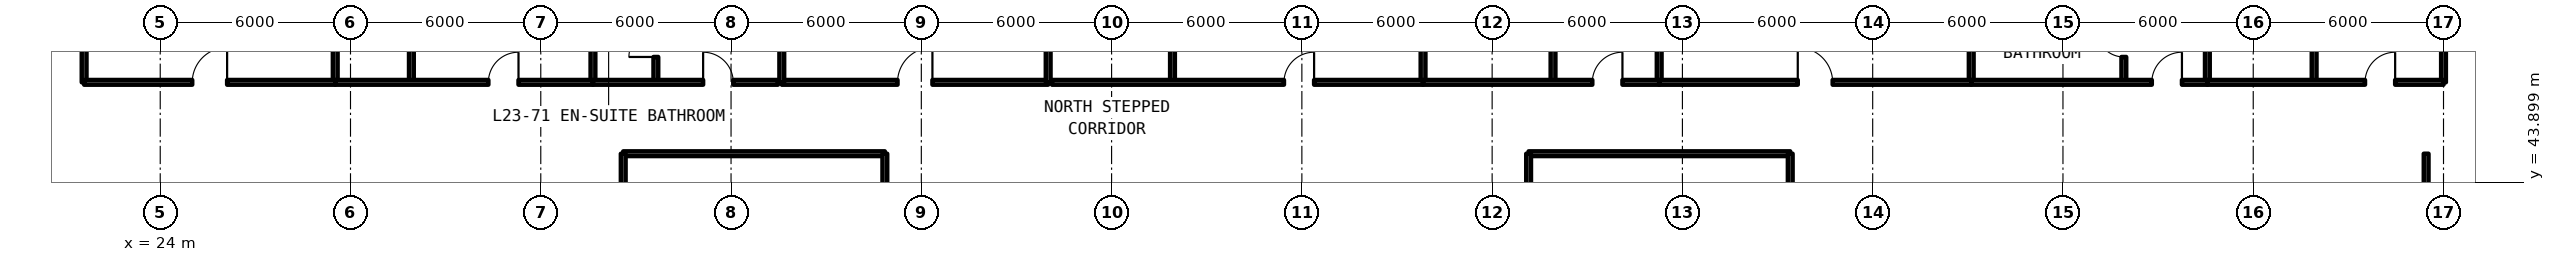
"""IFC4 building model, lengths in metres.
Left out: names, types, materials, properties, quantities, classifications, styles, units other than length and angle.
Written with IfcOpenShell. Run it as: python <this file> out.ifc"""

import sys

from ifc_helpers import new_model, si_unit, direction, frame, frame_2d, origin, place, context, subcontext, project, spatial, rectangle, extrude, element, fill, save


model = new_model("IFC4")
c1 = context("Model", 3, precision=1e-05, world=origin(), true_north=direction((0.0, 1.0)))
c2 = subcontext(c1, "Body", "Model", "MODEL_VIEW")
j1 = project(units=[si_unit("LENGTHUNIT", "METRE"), si_unit("PLANEANGLEUNIT", "RADIAN")], contexts=[c1])
p1 = place(None, origin())
s1 = spatial("IfcSite", under=j1, at=p1, CompositionType="ELEMENT")
p2 = place(p1, origin())
s2 = spatial("IfcBuilding", under=s1, at=p2, CompositionType="ELEMENT")
p3 = place(p2, frame((0.0, 0.0, 85.47)))
s3 = spatial("IfcBuildingStorey", under=s2, at=p3, CompositionType="ELEMENT", Elevation=85.47)
p4 = place(p3, frame((38.6, 44.8, 0.0), z_axis=(0.0, 0.0, 1.0), x_axis=(1.0, 0.0, 0.0)))
e1 = element("IfcWall", 1, at=p4, inside=s3, PredefinedType="SOLIDWALL", context=c2, shape_type="SweptSolid", body=[
    extrude(rectangle(XDim=8.25, YDim=0.15, at=frame_2d((4.125, 0.0))), origin(), (0.0, 0.0, 1.0), 2.35),
])
p5 = place(p3, frame((38.6, 22.4, 0.0), z_axis=(0.0, 0.0, 1.0), x_axis=(0.0, 1.0, 0.0)))
e2 = element("IfcWall", 2, at=p5, inside=s3, PredefinedType="SOLIDWALL", context=c2, shape_type="SweptSolid", body=[
    extrude(rectangle(XDim=22.4, YDim=0.15, at=frame_2d((11.2, 0.0))), origin(), (0.0, 0.0, 1.0), 2.35),
])
p6 = place(p5, frame((8.025, 0.0, 0.0)))
e3 = element("IfcOpeningElement", 3, at=p6, cuts=e2, PredefinedType="OPENING", context=c2, shape_type="SweptSolid", body=[
    extrude(rectangle(XDim=0.95, YDim=2.15, at=frame_2d((0.475, 1.075))), frame((0.0, 0.085, 0.0), z_axis=(0.0, -1.0, 0.0), x_axis=(1.0, 0.0, 0.0)), (0.0, 0.0, 1.0), 0.17),
])
p7 = place(p3, frame((46.85, 22.4, 0.0), z_axis=(0.0, 0.0, 1.0), x_axis=(0.0, 1.0, 0.0)))
e4 = element("IfcWall", 4, at=p7, inside=s3, PredefinedType="SOLIDWALL", context=c2, shape_type="SweptSolid", body=[
    extrude(rectangle(XDim=22.4, YDim=0.15, at=frame_2d((11.2, 0.0))), origin(), (0.0, 0.0, 1.0), 2.35),
])
p8 = place(p3, frame((67.15, 44.8, 0.0), z_axis=(0.0, 0.0, 1.0), x_axis=(1.0, 0.0, 0.0)))
e5 = element("IfcWall", 5, at=p8, inside=s3, PredefinedType="SOLIDWALL", context=c2, shape_type="SweptSolid", body=[
    extrude(rectangle(XDim=8.25, YDim=0.15, at=frame_2d((4.125, 0.0))), origin(), (0.0, 0.0, 1.0), 2.35),
])
p9 = place(p3, frame((67.15, 22.4, 0.0), z_axis=(0.0, 0.0, 1.0), x_axis=(0.0, 1.0, 0.0)))
e6 = element("IfcWall", 6, at=p9, inside=s3, PredefinedType="SOLIDWALL", context=c2, shape_type="SweptSolid", body=[
    extrude(rectangle(XDim=22.4, YDim=0.15, at=frame_2d((11.2, 0.0))), origin(), (0.0, 0.0, 1.0), 2.35),
])
p10 = place(p3, frame((75.4, 22.4, 0.0), z_axis=(0.0, 0.0, 1.0), x_axis=(0.0, 1.0, 0.0)))
e7 = element("IfcWall", 7, at=p10, inside=s3, PredefinedType="SOLIDWALL", context=c2, shape_type="SweptSolid", body=[
    extrude(rectangle(XDim=22.4, YDim=0.15, at=frame_2d((11.2, 0.0))), origin(), (0.0, 0.0, 1.0), 2.35),
])
p11 = place(p10, frame((8.025, 0.0, 0.0)))
e8 = element("IfcOpeningElement", 8, at=p11, cuts=e7, PredefinedType="OPENING", context=c2, shape_type="SweptSolid", body=[
    extrude(rectangle(XDim=0.95, YDim=2.15, at=frame_2d((0.475, 1.075))), frame((0.0, 0.085, 0.0), z_axis=(0.0, -1.0, 0.0), x_axis=(1.0, 0.0, 0.0)), (0.0, 0.0, 1.0), 0.17),
])
p12 = place(p3, frame((95.452, 39.6, 0.0), z_axis=(0.0, 0.0, 1.0), x_axis=(0.0, 1.0, 0.0)))
e9 = element("IfcWall", 9, at=p12, inside=s3, PredefinedType="PARTITIONING", context=c2, shape_type="SweptSolid", body=[
    extrude(rectangle(XDim=5.2, YDim=0.15, at=frame_2d((2.6, 0.0))), origin(), (0.0, 0.0, 1.0), 2.35),
])
p13 = place(p3, frame((43.6, 47.05, 0.0), z_axis=(0.0, 0.0, 1.0), x_axis=(1.0, 0.0, 0.0)))
e10 = element("IfcWall", 10, at=p13, inside=s3, PredefinedType="SOLIDWALL", context=c2, shape_type="SweptSolid", body=[
    extrude(rectangle(XDim=8.4, YDim=0.15, at=frame_2d((4.2, 0.0))), origin(), (0.0, 0.0, 1.0), 2.35),
])
p14 = place(p13, frame((3.65, 0.0, 0.0)))
e11 = element("IfcOpeningElement", 11, at=p14, cuts=e10, PredefinedType="OPENING", context=c2, shape_type="SweptSolid", body=[
    extrude(rectangle(XDim=1.1, YDim=2.15, at=frame_2d((0.55, 1.075))), frame((0.0, 0.085, 0.0), z_axis=(0.0, -1.0, 0.0), x_axis=(1.0, 0.0, 0.0)), (0.0, 0.0, 1.0), 0.17),
])
for number, where, z_axis, x_axis in (
    (12, (43.6, 47.05, 0.0), (0.0, 0.0, 1.0), (0.0, 1.0, 0.0)),
    (13, (52.0, 47.05, 0.0), (0.0, 0.0, 1.0), (0.0, 1.0, 0.0)),
    (14, (21.6, 47.05, 0.0), (0.0, 0.0, 1.0), (0.0, 1.0, 0.0)),
    (15, (29.519, 47.05, 0.0), (0.0, 0.0, 1.0), (0.0, 1.0, 0.0)),
):
    element("IfcWall", number, at=place(p3, frame(where, z_axis=z_axis, x_axis=x_axis)), inside=s3, PredefinedType="SOLIDWALL", context=c2, shape_type="SweptSolid", body=[
        extrude(rectangle(XDim=10.3, YDim=0.15, at=frame_2d((5.15, 0.0))), origin(), (0.0, 0.0, 1.0), 2.35),
    ])
p15 = place(p3, frame((21.6, 47.05, 0.0), z_axis=(0.0, 0.0, 1.0), x_axis=(1.0, 0.0, 0.0)))
e16 = element("IfcWall", 16, at=p15, inside=s3, PredefinedType="SOLIDWALL", context=c2, shape_type="SweptSolid", body=[
    extrude(rectangle(XDim=7.918, YDim=0.15, at=frame_2d((3.959, 0.0))), origin(), (0.0, 0.0, 1.0), 2.35),
])
p16 = place(p15, frame((3.409, 0.0, 0.0)))
e17 = element("IfcOpeningElement", 17, at=p16, cuts=e16, PredefinedType="OPENING", context=c2, shape_type="SweptSolid", body=[
    extrude(rectangle(XDim=1.1, YDim=2.15, at=frame_2d((0.55, 1.075))), frame((0.0, 0.085, 0.0), z_axis=(0.0, -1.0, 0.0), x_axis=(1.0, 0.0, 0.0)), (0.0, 0.0, 1.0), 0.17),
])
p17 = place(p3, frame((37.646, 47.05, 0.0), z_axis=(0.0, 0.0, 1.0), x_axis=(0.0, 1.0, 0.0)))
e18 = element("IfcWall", 18, at=p17, inside=s3, PredefinedType="SOLIDWALL", context=c2, shape_type="SweptSolid", body=[
    extrude(rectangle(XDim=10.3, YDim=0.15, at=frame_2d((5.15, 0.0))), origin(), (0.0, 0.0, 1.0), 2.35),
])
p18 = place(p3, frame((31.92, 47.05, 0.0), z_axis=(0.0, 0.0, 1.0), x_axis=(0.0, 1.0, 0.0)))
e19 = element("IfcWall", 19, at=p18, inside=s3, PredefinedType="PARTITIONING", context=c2, shape_type="SweptSolid", body=[
    extrude(rectangle(XDim=6.67, YDim=0.15, at=frame_2d((3.335, 0.0))), origin(), (0.0, 0.0, 1.0), 2.35),
])
p19 = place(p18, frame((1.543, 0.0, 0.0)))
e20 = element("IfcOpeningElement", 20, at=p19, cuts=e19, PredefinedType="OPENING", context=c2, shape_type="SweptSolid", body=[
    extrude(rectangle(XDim=0.85, YDim=2.1, at=frame_2d((0.425, 1.05))), frame((0.0, 0.085, 0.0), z_axis=(0.0, -1.0, 0.0), x_axis=(1.0, 0.0, 0.0)), (0.0, 0.0, 1.0), 0.17),
])
p20 = place(p18, frame((4.878, 0.0, 0.0)))
e21 = element("IfcOpeningElement", 21, at=p20, cuts=e19, PredefinedType="OPENING", context=c2, shape_type="SweptSolid", body=[
    extrude(rectangle(XDim=0.85, YDim=2.1, at=frame_2d((0.425, 1.05))), frame((0.0, 0.085, 0.0), z_axis=(0.0, -1.0, 0.0), x_axis=(1.0, 0.0, 0.0)), (0.0, 0.0, 1.0), 0.17),
])
p21 = place(p3, frame((29.519, 47.05, 0.0), z_axis=(0.0, 0.0, 1.0), x_axis=(1.0, 0.0, 0.0)))
e22 = element("IfcWall", 22, at=p21, inside=s3, PredefinedType="SOLIDWALL", context=c2, shape_type="SweptSolid", body=[
    extrude(rectangle(XDim=8.127, YDim=0.15, at=frame_2d((4.063, 0.0))), origin(), (0.0, 0.0, 1.0), 2.35),
])
p22 = place(p21, frame((4.829, 0.0, 0.0)))
e23 = element("IfcOpeningElement", 23, at=p22, cuts=e22, PredefinedType="OPENING", context=c2, shape_type="SweptSolid", body=[
    extrude(rectangle(XDim=0.95, YDim=2.15, at=frame_2d((0.475, 1.075))), frame((0.0, 0.085, 0.0), z_axis=(0.0, -1.0, 0.0), x_axis=(1.0, 0.0, 0.0)), (0.0, 0.0, 1.0), 0.17),
])
p23 = place(p3, frame((39.629, 47.05, 0.0), z_axis=(0.0, 0.0, 1.0), x_axis=(0.0, 1.0, 0.0)))
e24 = element("IfcWall", 24, at=p23, inside=s3, PredefinedType="PARTITIONING", context=c2, shape_type="SweptSolid", body=[
    extrude(rectangle(XDim=10.3, YDim=0.15, at=frame_2d((5.15, 0.0))), origin(), (0.0, 0.0, 1.0), 2.35),
])
p24 = place(p23, frame((0.8, 0.0, 0.0)))
e25 = element("IfcOpeningElement", 25, at=p24, cuts=e24, PredefinedType="OPENING", context=c2, shape_type="SweptSolid", body=[
    extrude(rectangle(XDim=0.85, YDim=2.1, at=frame_2d((0.425, 1.05))), frame((0.0, 0.085, 0.0), z_axis=(0.0, -1.0, 0.0), x_axis=(1.0, 0.0, 0.0)), (0.0, 0.0, 1.0), 0.17),
])
p25 = place(p23, frame((5.25, 0.0, 0.0)))
e26 = element("IfcOpeningElement", 26, at=p25, cuts=e24, PredefinedType="OPENING", context=c2, shape_type="SweptSolid", body=[
    extrude(rectangle(XDim=0.85, YDim=2.1, at=frame_2d((0.425, 1.05))), frame((0.0, 0.085, 0.0), z_axis=(0.0, -1.0, 0.0), x_axis=(1.0, 0.0, 0.0)), (0.0, 0.0, 1.0), 0.17),
])
p26 = place(p3, frame((37.646, 47.05, 0.0), z_axis=(0.0, 0.0, 1.0), x_axis=(1.0, 0.0, 0.0)))
e27 = element("IfcWall", 27, at=p26, inside=s3, PredefinedType="SOLIDWALL", context=c2, shape_type="SweptSolid", body=[
    extrude(rectangle(XDim=5.834, YDim=0.15, at=frame_2d((2.917, 0.0))), origin(), (0.0, 0.0, 1.0), 2.35),
])
p27 = place(p26, frame((3.474, 0.0, 0.0)))
e28 = element("IfcOpeningElement", 28, at=p27, cuts=e27, PredefinedType="OPENING", context=c2, shape_type="SweptSolid", body=[
    extrude(rectangle(XDim=0.95, YDim=2.15, at=frame_2d((0.475, 1.075))), frame((0.0, 0.085, 0.0), z_axis=(0.0, -1.0, 0.0), x_axis=(1.0, 0.0, 0.0)), (0.0, 0.0, 1.0), 0.17),
])
for number, where, z_axis, x_axis in (
    (29, (96.0, 47.05, 0.0), (0.0, 0.0, 1.0), (0.0, 1.0, 0.0)),
    (30, (63.821, 47.05, 0.0), (0.0, 0.0, 1.0), (0.0, 1.0, 0.0)),
):
    element("IfcWall", number, at=place(p3, frame(where, z_axis=z_axis, x_axis=x_axis)), inside=s3, PredefinedType="SOLIDWALL", context=c2, shape_type="SweptSolid", body=[
        extrude(rectangle(XDim=10.3, YDim=0.15, at=frame_2d((5.15, 0.0))), origin(), (0.0, 0.0, 1.0), 2.35),
    ])
p28 = place(p3, frame((55.92, 47.05, 0.0), z_axis=(0.0, 0.0, 1.0), x_axis=(0.0, 1.0, 0.0)))
e31 = element("IfcWall", 31, at=p28, inside=s3, PredefinedType="PARTITIONING", context=c2, shape_type="SweptSolid", body=[
    extrude(rectangle(XDim=5.452, YDim=0.15, at=frame_2d((2.726, 0.0))), origin(), (0.0, 0.0, 1.0), 2.35),
])
p29 = place(p28, frame((1.183, 0.0, 0.0)))
e32 = element("IfcOpeningElement", 32, at=p29, cuts=e31, PredefinedType="OPENING", context=c2, shape_type="SweptSolid", body=[
    extrude(rectangle(XDim=0.85, YDim=2.1, at=frame_2d((0.425, 1.05))), frame((0.0, 0.085, 0.0), z_axis=(0.0, -1.0, 0.0), x_axis=(1.0, 0.0, 0.0)), (0.0, 0.0, 1.0), 0.17),
])
p30 = place(p28, frame((3.909, 0.0, 0.0)))
e33 = element("IfcOpeningElement", 33, at=p30, cuts=e31, PredefinedType="OPENING", context=c2, shape_type="SweptSolid", body=[
    extrude(rectangle(XDim=0.85, YDim=2.1, at=frame_2d((0.425, 1.05))), frame((0.0, 0.085, 0.0), z_axis=(0.0, -1.0, 0.0), x_axis=(1.0, 0.0, 0.0)), (0.0, 0.0, 1.0), 0.17),
])
p31 = place(p3, frame((52.12, 47.05, 0.0), z_axis=(0.0, 0.0, 1.0), x_axis=(1.0, 0.0, 0.0)))
e34 = element("IfcWall", 34, at=p31, inside=s3, PredefinedType="SOLIDWALL", context=c2, shape_type="SweptSolid", body=[
    extrude(rectangle(XDim=11.701, YDim=0.15, at=frame_2d((5.851, 0.0))), origin(), (0.0, 0.0, 1.0), 2.35),
])
p32 = place(p31, frame((7.316, 0.0, 0.0)))
e35 = element("IfcOpeningElement", 35, at=p32, cuts=e34, PredefinedType="OPENING", context=c2, shape_type="SweptSolid", body=[
    extrude(rectangle(XDim=0.95, YDim=2.15, at=frame_2d((0.475, 1.075))), frame((0.0, 0.085, 0.0), z_axis=(0.0, -1.0, 0.0), x_axis=(1.0, 0.0, 0.0)), (0.0, 0.0, 1.0), 0.17),
])
p33 = place(p3, frame((71.268, 47.05, 0.0), z_axis=(0.0, 0.0, 1.0), x_axis=(0.0, 1.0, 0.0)))
e36 = element("IfcWall", 36, at=p33, inside=s3, PredefinedType="SOLIDWALL", context=c2, shape_type="SweptSolid", body=[
    extrude(rectangle(XDim=10.3, YDim=0.15, at=frame_2d((5.15, 0.0))), origin(), (0.0, 0.0, 1.0), 2.35),
])
p34 = place(p3, frame((67.92, 47.05, 0.0), z_axis=(0.0, 0.0, 1.0), x_axis=(0.0, 1.0, 0.0)))
e37 = element("IfcWall", 37, at=p34, inside=s3, PredefinedType="PARTITIONING", context=c2, shape_type="SweptSolid", body=[
    extrude(rectangle(XDim=6.338, YDim=0.15, at=frame_2d((3.169, 0.0))), origin(), (0.0, 0.0, 1.0), 2.35),
])
p35 = place(p34, frame((1.445, 0.0, 0.0)))
e38 = element("IfcOpeningElement", 38, at=p35, cuts=e37, PredefinedType="OPENING", context=c2, shape_type="SweptSolid", body=[
    extrude(rectangle(XDim=0.85, YDim=2.1, at=frame_2d((0.425, 1.05))), frame((0.0, 0.085, 0.0), z_axis=(0.0, -1.0, 0.0), x_axis=(1.0, 0.0, 0.0)), (0.0, 0.0, 1.0), 0.17),
])
p36 = place(p34, frame((4.614, 0.0, 0.0)))
e39 = element("IfcOpeningElement", 39, at=p36, cuts=e37, PredefinedType="OPENING", context=c2, shape_type="SweptSolid", body=[
    extrude(rectangle(XDim=0.85, YDim=2.1, at=frame_2d((0.425, 1.05))), frame((0.0, 0.085, 0.0), z_axis=(0.0, -1.0, 0.0), x_axis=(1.0, 0.0, 0.0)), (0.0, 0.0, 1.0), 0.17),
])
p37 = place(p3, frame((63.821, 47.05, 0.0), z_axis=(0.0, 0.0, 1.0), x_axis=(1.0, 0.0, 0.0)))
e40 = element("IfcWall", 40, at=p37, inside=s3, PredefinedType="SOLIDWALL", context=c2, shape_type="SweptSolid", body=[
    extrude(rectangle(XDim=7.446, YDim=0.15, at=frame_2d((3.723, 0.0))), origin(), (0.0, 0.0, 1.0), 2.35),
])
p38 = place(p37, frame((5.337, 0.0, 0.0)))
e41 = element("IfcOpeningElement", 41, at=p38, cuts=e40, PredefinedType="OPENING", context=c2, shape_type="SweptSolid", body=[
    extrude(rectangle(XDim=0.95, YDim=2.15, at=frame_2d((0.475, 1.075))), frame((0.0, 0.085, 0.0), z_axis=(0.0, -1.0, 0.0), x_axis=(1.0, 0.0, 0.0)), (0.0, 0.0, 1.0), 0.17),
])
p39 = place(p3, frame((81.107, 47.05, 0.0), z_axis=(0.0, 0.0, 1.0), x_axis=(0.0, 1.0, 0.0)))
e42 = element("IfcWall", 42, at=p39, inside=s3, PredefinedType="SOLIDWALL", context=c2, shape_type="SweptSolid", body=[
    extrude(rectangle(XDim=10.3, YDim=0.15, at=frame_2d((5.15, 0.0))), origin(), (0.0, 0.0, 1.0), 2.35),
])
p40 = place(p3, frame((71.268, 47.05, 0.0), z_axis=(0.0, 0.0, 1.0), x_axis=(1.0, 0.0, 0.0)))
e43 = element("IfcWall", 43, at=p40, inside=s3, PredefinedType="SOLIDWALL", context=c2, shape_type="SweptSolid", body=[
    extrude(rectangle(XDim=9.84, YDim=0.15, at=frame_2d((4.92, 0.0))), origin(), (0.0, 0.0, 1.0), 2.35),
])
p41 = place(p40, frame((4.37, 0.0, 0.0)))
e44 = element("IfcOpeningElement", 44, at=p41, cuts=e43, PredefinedType="OPENING", context=c2, shape_type="SweptSolid", body=[
    extrude(rectangle(XDim=1.1, YDim=2.15, at=frame_2d((0.55, 1.075))), frame((0.0, 0.085, 0.0), z_axis=(0.0, -1.0, 0.0), x_axis=(1.0, 0.0, 0.0)), (0.0, 0.0, 1.0), 0.17),
])
p42 = place(p3, frame((88.554, 47.05, 0.0), z_axis=(0.0, 0.0, 1.0), x_axis=(0.0, 1.0, 0.0)))
e45 = element("IfcWall", 45, at=p42, inside=s3, PredefinedType="SOLIDWALL", context=c2, shape_type="SweptSolid", body=[
    extrude(rectangle(XDim=10.3, YDim=0.15, at=frame_2d((5.15, 0.0))), origin(), (0.0, 0.0, 1.0), 2.35),
])
p43 = place(p3, frame((85.92, 47.05, 0.0), z_axis=(0.0, 0.0, 1.0), x_axis=(0.0, 1.0, 0.0)))
e46 = element("IfcWall", 46, at=p43, inside=s3, PredefinedType="PARTITIONING", context=c2, shape_type="SweptSolid", body=[
    extrude(rectangle(XDim=10.3, YDim=0.15, at=frame_2d((5.15, 0.0))), origin(), (0.0, 0.0, 1.0), 2.35),
])
p44 = place(p43, frame((0.8, 0.0, 0.0)))
e47 = element("IfcOpeningElement", 47, at=p44, cuts=e46, PredefinedType="OPENING", context=c2, shape_type="SweptSolid", body=[
    extrude(rectangle(XDim=0.85, YDim=2.1, at=frame_2d((0.425, 1.05))), frame((0.0, 0.085, 0.0), z_axis=(0.0, -1.0, 0.0), x_axis=(1.0, 0.0, 0.0)), (0.0, 0.0, 1.0), 0.17),
])
p45 = place(p43, frame((5.25, 0.0, 0.0)))
e48 = element("IfcOpeningElement", 48, at=p45, cuts=e46, PredefinedType="OPENING", context=c2, shape_type="SweptSolid", body=[
    extrude(rectangle(XDim=0.85, YDim=2.1, at=frame_2d((0.425, 1.05))), frame((0.0, 0.085, 0.0), z_axis=(0.0, -1.0, 0.0), x_axis=(1.0, 0.0, 0.0)), (0.0, 0.0, 1.0), 0.17),
])
p46 = place(p3, frame((81.107, 47.05, 0.0), z_axis=(0.0, 0.0, 1.0), x_axis=(1.0, 0.0, 0.0)))
e49 = element("IfcWall", 49, at=p46, inside=s3, PredefinedType="SOLIDWALL", context=c2, shape_type="SweptSolid", body=[
    extrude(rectangle(XDim=7.446, YDim=0.15, at=frame_2d((3.723, 0.0))), origin(), (0.0, 0.0, 1.0), 2.35),
])
p47 = place(p46, frame((5.694, 0.0, 0.0)))
e50 = element("IfcOpeningElement", 50, at=p47, cuts=e49, PredefinedType="OPENING", context=c2, shape_type="SweptSolid", body=[
    extrude(rectangle(XDim=0.95, YDim=2.15, at=frame_2d((0.475, 1.075))), frame((0.0, 0.085, 0.0), z_axis=(0.0, -1.0, 0.0), x_axis=(1.0, 0.0, 0.0)), (0.0, 0.0, 1.0), 0.17),
])
p48 = place(p3, frame((91.92, 47.05, 0.0), z_axis=(0.0, 0.0, 1.0), x_axis=(0.0, 1.0, 0.0)))
e51 = element("IfcWall", 51, at=p48, inside=s3, PredefinedType="PARTITIONING", context=c2, shape_type="SweptSolid", body=[
    extrude(rectangle(XDim=6.338, YDim=0.15, at=frame_2d((3.169, 0.0))), origin(), (0.0, 0.0, 1.0), 2.35),
])
p49 = place(p48, frame((1.445, 0.0, 0.0)))
e52 = element("IfcOpeningElement", 52, at=p49, cuts=e51, PredefinedType="OPENING", context=c2, shape_type="SweptSolid", body=[
    extrude(rectangle(XDim=0.85, YDim=2.1, at=frame_2d((0.425, 1.05))), frame((0.0, 0.085, 0.0), z_axis=(0.0, -1.0, 0.0), x_axis=(1.0, 0.0, 0.0)), (0.0, 0.0, 1.0), 0.17),
])
p50 = place(p48, frame((4.614, 0.0, 0.0)))
e53 = element("IfcOpeningElement", 53, at=p50, cuts=e51, PredefinedType="OPENING", context=c2, shape_type="SweptSolid", body=[
    extrude(rectangle(XDim=0.85, YDim=2.1, at=frame_2d((0.425, 1.05))), frame((0.0, 0.085, 0.0), z_axis=(0.0, -1.0, 0.0), x_axis=(1.0, 0.0, 0.0)), (0.0, 0.0, 1.0), 0.17),
])
p51 = place(p3, frame((88.554, 47.05, 0.0), z_axis=(0.0, 0.0, 1.0), x_axis=(1.0, 0.0, 0.0)))
e54 = element("IfcWall", 54, at=p51, inside=s3, PredefinedType="SOLIDWALL", context=c2, shape_type="SweptSolid", body=[
    extrude(rectangle(XDim=7.446, YDim=0.15, at=frame_2d((3.723, 0.0))), origin(), (0.0, 0.0, 1.0), 2.35),
])
p52 = place(p51, frame((4.971, 0.0, 0.0)))
e55 = element("IfcOpeningElement", 55, at=p52, cuts=e54, PredefinedType="OPENING", context=c2, shape_type="SweptSolid", body=[
    extrude(rectangle(XDim=0.95, YDim=2.15, at=frame_2d((0.475, 1.075))), frame((0.0, 0.085, 0.0), z_axis=(0.0, -1.0, 0.0), x_axis=(1.0, 0.0, 0.0)), (0.0, 0.0, 1.0), 0.17),
])
p53 = place(p14, origin())
e56 = element("IfcDoor", 56, at=p53, inside=s3, OperationType="SINGLE_SWING_RIGHT", PredefinedType="DOOR", context=c2, shape_type="SweptSolid", body=[
    extrude(rectangle(XDim=1.1, YDim=2.15, at=frame_2d((0.55, 1.075))), frame((0.0, 0.025, 0.0), z_axis=(0.0, -1.0, 0.0), x_axis=(1.0, 0.0, 0.0)), (0.0, 0.0, 1.0), 0.05),
])
fill(e11, e56)
p54 = place(p16, origin())
e57 = element("IfcDoor", 57, at=p54, inside=s3, OperationType="SINGLE_SWING_RIGHT", PredefinedType="DOOR", context=c2, shape_type="SweptSolid", body=[
    extrude(rectangle(XDim=1.1, YDim=2.15, at=frame_2d((0.55, 1.075))), frame((0.0, 0.025, 0.0), z_axis=(0.0, -1.0, 0.0), x_axis=(1.0, 0.0, 0.0)), (0.0, 0.0, 1.0), 0.05),
])
fill(e17, e57)
p55 = place(p22, origin())
e58 = element("IfcDoor", 58, at=p55, inside=s3, OperationType="SINGLE_SWING_RIGHT", PredefinedType="DOOR", context=c2, shape_type="SweptSolid", body=[
    extrude(rectangle(XDim=0.95, YDim=2.15, at=frame_2d((0.475, 1.075))), frame((0.0, 0.025, 0.0), z_axis=(0.0, -1.0, 0.0), x_axis=(1.0, 0.0, 0.0)), (0.0, 0.0, 1.0), 0.05),
])
fill(e23, e58)
p56 = place(p24, origin())
e59 = element("IfcDoor", 59, at=p56, inside=s3, OperationType="SINGLE_SWING_LEFT", PredefinedType="DOOR", context=c2, shape_type="SweptSolid", body=[
    extrude(rectangle(XDim=0.85, YDim=2.1, at=frame_2d((0.425, 1.05))), frame((0.0, 0.025, 0.0), z_axis=(0.0, -1.0, 0.0), x_axis=(1.0, 0.0, 0.0)), (0.0, 0.0, 1.0), 0.05),
])
fill(e25, e59)
p57 = place(p27, origin())
e60 = element("IfcDoor", 60, at=p57, inside=s3, OperationType="SINGLE_SWING_LEFT", PredefinedType="DOOR", context=c2, shape_type="SweptSolid", body=[
    extrude(rectangle(XDim=0.95, YDim=2.15, at=frame_2d((0.475, 1.075))), frame((0.0, 0.025, 0.0), z_axis=(0.0, -1.0, 0.0), x_axis=(1.0, 0.0, 0.0)), (0.0, 0.0, 1.0), 0.05),
])
fill(e28, e60)
p58 = place(p32, origin())
e61 = element("IfcDoor", 61, at=p58, inside=s3, OperationType="SINGLE_SWING_RIGHT", PredefinedType="DOOR", context=c2, shape_type="SweptSolid", body=[
    extrude(rectangle(XDim=0.95, YDim=2.15, at=frame_2d((0.475, 1.075))), frame((0.0, 0.025, 0.0), z_axis=(0.0, -1.0, 0.0), x_axis=(1.0, 0.0, 0.0)), (0.0, 0.0, 1.0), 0.05),
])
fill(e35, e61)
p59 = place(p38, origin())
e62 = element("IfcDoor", 62, at=p59, inside=s3, OperationType="SINGLE_SWING_RIGHT", PredefinedType="DOOR", context=c2, shape_type="SweptSolid", body=[
    extrude(rectangle(XDim=0.95, YDim=2.15, at=frame_2d((0.475, 1.075))), frame((0.0, 0.025, 0.0), z_axis=(0.0, -1.0, 0.0), x_axis=(1.0, 0.0, 0.0)), (0.0, 0.0, 1.0), 0.05),
])
fill(e41, e62)
p60 = place(p41, origin())
e63 = element("IfcDoor", 63, at=p60, inside=s3, OperationType="SINGLE_SWING_LEFT", PredefinedType="DOOR", context=c2, shape_type="SweptSolid", body=[
    extrude(rectangle(XDim=1.1, YDim=2.15, at=frame_2d((0.55, 1.075))), frame((0.0, 0.025, 0.0), z_axis=(0.0, -1.0, 0.0), x_axis=(1.0, 0.0, 0.0)), (0.0, 0.0, 1.0), 0.05),
])
fill(e44, e63)
p61 = place(p44, origin())
e64 = element("IfcDoor", 64, at=p61, inside=s3, OperationType="SINGLE_SWING_RIGHT", PredefinedType="DOOR", context=c2, shape_type="SweptSolid", body=[
    extrude(rectangle(XDim=0.85, YDim=2.1, at=frame_2d((0.425, 1.05))), frame((0.0, 0.025, 0.0), z_axis=(0.0, -1.0, 0.0), x_axis=(1.0, 0.0, 0.0)), (0.0, 0.0, 1.0), 0.05),
])
fill(e47, e64)
p62 = place(p47, origin())
e65 = element("IfcDoor", 65, at=p62, inside=s3, OperationType="SINGLE_SWING_RIGHT", PredefinedType="DOOR", context=c2, shape_type="SweptSolid", body=[
    extrude(rectangle(XDim=0.95, YDim=2.15, at=frame_2d((0.475, 1.075))), frame((0.0, 0.025, 0.0), z_axis=(0.0, -1.0, 0.0), x_axis=(1.0, 0.0, 0.0)), (0.0, 0.0, 1.0), 0.05),
])
fill(e50, e65)
p63 = place(p52, origin())
e66 = element("IfcDoor", 66, at=p63, inside=s3, OperationType="SINGLE_SWING_RIGHT", PredefinedType="DOOR", context=c2, shape_type="SweptSolid", body=[
    extrude(rectangle(XDim=0.95, YDim=2.15, at=frame_2d((0.475, 1.075))), frame((0.0, 0.025, 0.0), z_axis=(0.0, -1.0, 0.0), x_axis=(1.0, 0.0, 0.0)), (0.0, 0.0, 1.0), 0.05),
])
fill(e55, e66)
save(model, sys.argv[1])
